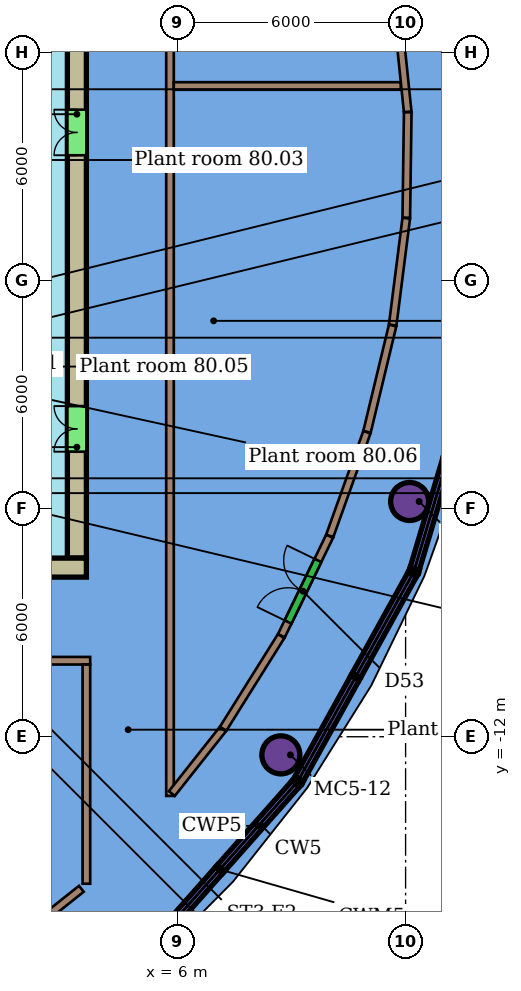
"""IFC4 building model, lengths in metres.
Left out: names, types, materials, properties, quantities, classifications, styles, units other than length and angle.
Written with IfcOpenShell. Run it as: python <this file> out.ifc"""

import sys

from ifc_helpers import new_model, si_unit, direction, frame, frame_2d, origin, origin_2d, place, context, subcontext, project, spatial, rectangle, hollow_circle, extrude, element, fill, save


model = new_model("IFC4")
c1 = context("Model", 3, precision=1e-05, world=origin(), true_north=direction((0.0, 1.0)))
c2 = subcontext(c1, "Body", "Model", "MODEL_VIEW")
j1 = project(units=[si_unit("LENGTHUNIT", "METRE"), si_unit("PLANEANGLEUNIT", "RADIAN")], contexts=[c1])
p1 = place(None, origin())
s1 = spatial("IfcSite", under=j1, at=p1, CompositionType="ELEMENT")
p2 = place(p1, origin())
s2 = spatial("IfcBuilding", under=s1, at=p2, CompositionType="ELEMENT")
p3 = place(p2, frame((0.0, 0.0, 321.3)))
s3 = spatial("IfcBuildingStorey", under=s2, at=p3, CompositionType="ELEMENT", Elevation=321.3)
for number, where, z_axis, x_axis in (
    (1, (8.718, -12.477, 0.0), (0.0, 0.0, 1.0), (1.0, 0.0, 0.0)),
    (2, (12.106, -5.81, 0.0), (0.0, 0.0, 1.0), (1.0, 0.0, 0.0)),
):
    element("IfcColumn", number, at=place(p3, frame(where, z_axis=z_axis, x_axis=x_axis)), inside=s3, PredefinedType="COLUMN", context=c2, shape_type="SweptSolid", body=[
        extrude(hollow_circle(Radius=0.5, WallThickness=0.04, at=origin_2d()), origin(), (0.0, 0.0, 1.0), 4.0),
    ])
p4 = place(p3, frame((5.8, -13.558, 0.0), z_axis=(0.0, 0.0, 1.0), x_axis=(0.0, 1.0, 0.0)))
e3 = element("IfcWall", 3, at=p4, inside=s3, PredefinedType="PARTITIONING", context=c2, shape_type="SweptSolid", body=[
    extrude(rectangle(XDim=23.658, YDim=0.2, at=frame_2d((11.829, 0.0))), origin(), (0.0, 0.0, 1.0), 3.65),
])
p5 = place(p3, frame((-17.7, -10.0, 0.0), z_axis=(0.0, 0.0, 1.0), x_axis=(1.0, 0.0, 0.0)))
e4 = element("IfcWall", 4, at=p5, inside=s3, PredefinedType="PARTITIONING", context=c2, shape_type="SweptSolid", body=[
    extrude(rectangle(XDim=21.4, YDim=0.2, at=frame_2d((10.7, 0.0))), origin(), (0.0, 0.0, 1.0), 3.65),
])
p6 = place(p3, frame((3.6, -15.867, 0.0), z_axis=(0.0, 0.0, 1.0), x_axis=(0.0, 1.0, 0.0)))
e5 = element("IfcWall", 5, at=p6, inside=s3, PredefinedType="PARTITIONING", context=c2, shape_type="SweptSolid", body=[
    extrude(rectangle(XDim=5.767, YDim=0.2, at=frame_2d((2.884, 0.0))), origin(), (0.0, 0.0, 1.0), 3.65),
])
p7 = place(p3, frame((5.9, 5.123, 0.0), z_axis=(0.0, 0.0, 1.0), x_axis=(1.0, 0.0, 0.0)))
e6 = element("IfcWall", 6, at=p7, inside=s3, PredefinedType="PARTITIONING", context=c2, shape_type="SweptSolid", body=[
    extrude(rectangle(XDim=5.974, YDim=0.2, at=frame_2d((2.987, 0.0))), origin(), (0.0, 0.0, 1.0), 3.65),
])
p8 = place(p3, frame((11.777, 7.129, 0.0), z_axis=(0.0, 0.0, 1.0), x_axis=(0.102877560919, -0.994694027055, 0.0)))
e7 = element("IfcWall", 7, at=p8, inside=s3, PredefinedType="PARTITIONING", context=c2, shape_type="SweptSolid", body=[
    extrude(rectangle(XDim=2.701, YDim=0.2, at=frame_2d((1.35, 0.0))), origin(), (0.0, 0.0, 1.0), 3.65),
])
p9 = place(p3, frame((12.018, 1.656, 0.0), z_axis=(0.0, 0.0, 1.0), x_axis=(0.013897320686, 0.999903427576, 0.0)))
e8 = element("IfcWall", 8, at=p9, inside=s3, PredefinedType="PARTITIONING", context=c2, shape_type="SweptSolid", body=[
    extrude(rectangle(XDim=2.776, YDim=0.2, at=frame_2d((1.388, 0.0))), origin(), (0.0, 0.0, 1.0), 3.65),
])
p10 = place(p3, frame((11.659, -1.169, 0.0), z_axis=(0.0, 0.0, 1.0), x_axis=(0.126302032537, 0.991991832919, 0.0)))
e9 = element("IfcWall", 9, at=p10, inside=s3, PredefinedType="PARTITIONING", context=c2, shape_type="SweptSolid", body=[
    extrude(rectangle(XDim=2.836, YDim=0.2, at=frame_2d((1.418, 0.0))), origin(), (0.0, 0.0, 1.0), 3.65),
])
p11 = place(p3, frame((10.984, -3.977, 0.0), z_axis=(0.0, 0.0, 1.0), x_axis=(0.234120678443, 0.972207543648, 0.0)))
e10 = element("IfcWall", 10, at=p11, inside=s3, PredefinedType="PARTITIONING", context=c2, shape_type="SweptSolid", body=[
    extrude(rectangle(XDim=2.877, YDim=0.2, at=frame_2d((1.438, 0.0))), origin(), (0.0, 0.0, 1.0), 3.65),
])
p12 = place(p3, frame((10.004, -6.716, 0.0), z_axis=(0.0, 0.0, 1.0), x_axis=(0.337478197562, 0.941333344873, 0.0)))
e11 = element("IfcWall", 11, at=p12, inside=s3, PredefinedType="PARTITIONING", context=c2, shape_type="SweptSolid", body=[
    extrude(rectangle(XDim=2.898, YDim=0.2, at=frame_2d((1.449, 0.0))), origin(), (0.0, 0.0, 1.0), 3.65),
])
p13 = place(p3, frame((8.73, -9.343, 0.0), z_axis=(0.0, 0.0, 1.0), x_axis=(0.436405284506, 0.89975020292, 0.0)))
e12 = element("IfcWall", 12, at=p13, inside=s3, PredefinedType="PARTITIONING", context=c2, shape_type="SweptSolid", body=[
    extrude(rectangle(XDim=2.909, YDim=0.2, at=frame_2d((1.455, 0.0))), origin(), (0.0, 0.0, 1.0), 3.65),
])
p14 = place(p13, frame((0.403, 0.0, 0.0)))
e13 = element("IfcOpeningElement", 13, at=p14, cuts=e12, PredefinedType="OPENING", context=c2, shape_type="SweptSolid", body=[
    extrude(rectangle(XDim=1.8, YDim=2.4, at=frame_2d((0.9, 1.2))), frame((0.0, 0.11, 0.0), z_axis=(0.0, -1.0, 0.0), x_axis=(1.0, 0.0, 0.0)), (0.0, 0.0, 1.0), 0.22),
])
p15 = place(p3, frame((7.198, -11.791, 0.0), z_axis=(0.0, 0.0, 1.0), x_axis=(0.530761457751, 0.847521253401, 0.0)))
e14 = element("IfcWall", 14, at=p15, inside=s3, PredefinedType="PARTITIONING", context=c2, shape_type="SweptSolid", body=[
    extrude(rectangle(XDim=2.877, YDim=0.2, at=frame_2d((1.438, 0.0))), origin(), (0.0, 0.0, 1.0), 3.65),
])
p16 = place(p3, frame((5.849, -13.496, 0.0), z_axis=(0.0, 0.0, 1.0), x_axis=(0.620321195124, 0.784347891487, 0.0)))
e15 = element("IfcWall", 15, at=p16, inside=s3, PredefinedType="PARTITIONING", context=c2, shape_type="SweptSolid", body=[
    extrude(rectangle(XDim=2.163, YDim=0.2, at=frame_2d((1.081, 0.0))), origin(), (0.0, 0.0, 1.0), 3.65),
])
p17 = place(p3, frame((1.345, -17.689, 0.0), z_axis=(0.0, 0.0, 1.0), x_axis=(0.782665833332, 0.62244212047, 0.0)))
e16 = element("IfcWall", 16, at=p17, inside=s3, PredefinedType="PARTITIONING", context=c2, shape_type="SweptSolid", body=[
    extrude(rectangle(XDim=2.712, YDim=0.2, at=frame_2d((1.356, 0.0))), origin(), (0.0, 0.0, 1.0), 3.65),
])
p18 = place(p3, frame((-15.6, -7.55, 0.0), z_axis=(0.0, 0.0, 1.0), x_axis=(1.0, 0.0, 0.0)))
e17 = element("IfcWall", 17, at=p18, inside=s3, PredefinedType="SHEAR", context=c2, shape_type="SweptSolid", body=[
    extrude(rectangle(XDim=19.2, YDim=0.5, at=frame_2d((9.6, 0.0))), origin(), (0.0, 0.0, 1.0), 3.9),
])
p19 = place(p18, frame((3.6, 0.0, 0.0)))
e18 = element("IfcOpeningElement", 18, at=p19, cuts=e17, PredefinedType="OPENING", context=c2, shape_type="SweptSolid", body=[
    extrude(rectangle(XDim=1.2, YDim=2.1, at=frame_2d((0.6, 1.05))), frame((0.0, 0.26, 0.0), z_axis=(0.0, -1.0, 0.0), x_axis=(1.0, 0.0, 0.0)), (0.0, 0.0, 1.0), 0.52),
])
p20 = place(p3, frame((3.35, -7.3, 0.0), z_axis=(0.0, 0.0, 1.0), x_axis=(0.0, 1.0, 0.0)))
e19 = element("IfcWall", 19, at=p20, inside=s3, PredefinedType="SHEAR", context=c2, shape_type="SweptSolid", body=[
    extrude(rectangle(XDim=14.6, YDim=0.5, at=frame_2d((7.3, 0.0))), origin(), (0.0, 0.0, 1.0), 3.9),
])
p21 = place(p20, frame((2.8, 0.0, 0.0)))
e20 = element("IfcOpeningElement", 20, at=p21, cuts=e19, PredefinedType="OPENING", context=c2, shape_type="SweptSolid", body=[
    extrude(rectangle(XDim=1.2, YDim=2.1, at=frame_2d((0.6, 1.05))), frame((0.0, 0.26, 0.0), z_axis=(0.0, -1.0, 0.0), x_axis=(1.0, 0.0, 0.0)), (0.0, 0.0, 1.0), 0.52),
])
p22 = place(p20, frame((10.6, 0.0, 0.0)))
e21 = element("IfcOpeningElement", 21, at=p22, cuts=e19, PredefinedType="OPENING", context=c2, shape_type="SweptSolid", body=[
    extrude(rectangle(XDim=1.2, YDim=2.1, at=frame_2d((0.6, 1.05))), frame((0.0, 0.26, 0.0), z_axis=(0.0, -1.0, 0.0), x_axis=(1.0, 0.0, 0.0)), (0.0, 0.0, 1.0), 0.52),
])
p23 = place(p14, origin())
e22 = element("IfcDoor", 22, at=p23, inside=s3, OperationType="DOUBLE_DOOR_SINGLE_SWING", PredefinedType="DOOR", context=c2, shape_type="SweptSolid", body=[
    extrude(rectangle(XDim=1.8, YDim=2.4, at=frame_2d((0.9, 1.2))), frame((0.0, 0.025, 0.0), z_axis=(0.0, -1.0, 0.0), x_axis=(1.0, 0.0, 0.0)), (0.0, 0.0, 1.0), 0.05),
])
fill(e13, e22)
p24 = place(p21, origin())
e23 = element("IfcDoor", 23, at=p24, inside=s3, OperationType="DOUBLE_DOOR_SINGLE_SWING", PredefinedType="NOTDEFINED", context=c2, shape_type="SweptSolid", body=[
    extrude(rectangle(XDim=1.2, YDim=2.1, at=frame_2d((0.6, 1.05))), frame((0.0, 0.025, 0.0), z_axis=(0.0, -1.0, 0.0), x_axis=(1.0, 0.0, 0.0)), (0.0, 0.0, 1.0), 0.05),
])
fill(e20, e23)
p25 = place(p22, origin())
e24 = element("IfcDoor", 24, at=p25, inside=s3, OperationType="DOUBLE_DOOR_SINGLE_SWING", PredefinedType="NOTDEFINED", context=c2, shape_type="SweptSolid", body=[
    extrude(rectangle(XDim=1.2, YDim=2.1, at=frame_2d((0.6, 1.05))), frame((0.0, 0.025, 0.0), z_axis=(0.0, -1.0, 0.0), x_axis=(1.0, 0.0, 0.0)), (0.0, 0.0, 1.0), 0.05),
])
fill(e21, e24)
save(model, sys.argv[1])
